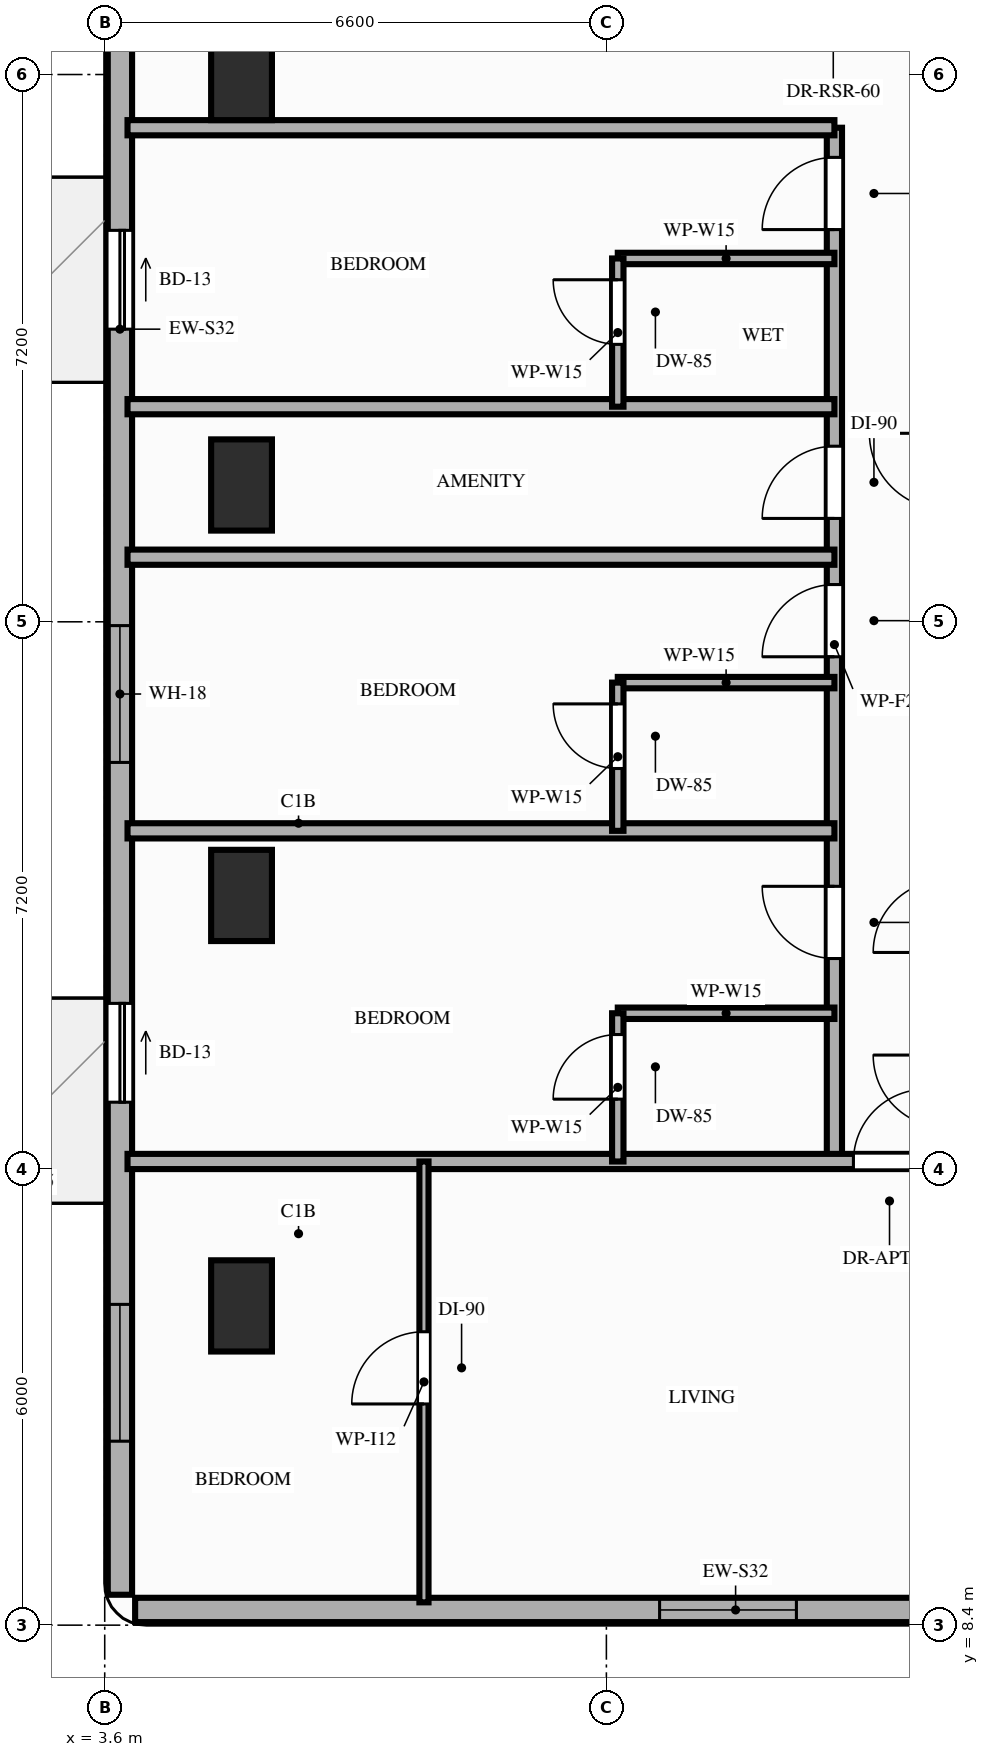
"""IFC4 building model, lengths in metres.
Left out: names, types, materials, properties, quantities, classifications, styles, units other than length and angle.
Written with IfcOpenShell. Run it as: python <this file> out.ifc"""

import sys

from ifc_helpers import new_model, si_unit, direction, frame, frame_2d, origin, origin_2d, place, context, subcontext, project, spatial, rectangle, extrude, element, fill, save


model = new_model("IFC4")
c1 = context("Model", 3, precision=1e-05, world=origin(), true_north=direction((0.0, 1.0)))
c2 = subcontext(c1, "Body", "Model", "MODEL_VIEW")
j1 = project(units=[si_unit("LENGTHUNIT", "METRE"), si_unit("PLANEANGLEUNIT", "RADIAN")], contexts=[c1])
p1 = place(None, origin())
s1 = spatial("IfcSite", under=j1, at=p1, CompositionType="ELEMENT")
p2 = place(p1, origin())
s2 = spatial("IfcBuilding", under=s1, at=p2, CompositionType="ELEMENT")
p3 = place(p2, frame((0.0, 0.0, 83.4)))
s3 = spatial("IfcBuildingStorey", under=s2, at=p3, CompositionType="ELEMENT", Elevation=83.4)
for number, where, z_axis, x_axis in (
    (1, (5.4, 12.6, 0.0), (0.0, 0.0, 1.0), (1.0, 0.0, 0.0)),
    (2, (5.4, 18.0, 0.0), (0.0, 0.0, 1.0), (1.0, 0.0, 0.0)),
    (3, (5.4, 23.4, 0.0), (0.0, 0.0, 1.0), (1.0, 0.0, 0.0)),
    (4, (5.4, 28.8, 0.0), (0.0, 0.0, 1.0), (1.0, 0.0, 0.0)),
):
    element("IfcColumn", number, at=place(p3, frame(where, z_axis=z_axis, x_axis=x_axis)), inside=s3, PredefinedType="COLUMN", context=c2, shape_type="SweptSolid", body=[
        extrude(rectangle(XDim=0.8, YDim=1.2, at=origin_2d()), origin(), (0.0, 0.0, 1.0), 3.2),
    ])
p4 = place(p3, frame((4.0, 8.6, 0.0), z_axis=(0.0, 0.0, 1.0), x_axis=(1.0, 0.0, 0.0)))
e5 = element("IfcWall", 5, at=p4, inside=s3, PredefinedType="STANDARD", context=c2, shape_type="SweptSolid", body=[
    extrude(rectangle(XDim=15.8, YDim=0.32, at=frame_2d((7.9, 0.0))), origin(), (0.0, 0.0, 1.0), 3.02),
])
p5 = place(p4, frame((6.9, 0.0, 0.85)))
e6 = element("IfcOpeningElement", 6, at=p5, cuts=e5, PredefinedType="OPENING", context=c2, shape_type="SweptSolid", body=[
    extrude(rectangle(XDim=1.8, YDim=1.75, at=frame_2d((0.9, 0.875))), frame((0.0, 0.17, 0.0), z_axis=(0.0, -1.0, 0.0), x_axis=(1.0, 0.0, 0.0)), (0.0, 0.0, 1.0), 0.34),
])
p6 = place(p3, frame((3.8, 42.1, 0.0), z_axis=(0.0, 0.0, 1.0), x_axis=(0.0, -1.0, 0.0)))
e7 = element("IfcWall", 7, at=p6, inside=s3, PredefinedType="STANDARD", context=c2, shape_type="SweptSolid", body=[
    extrude(rectangle(XDim=33.3, YDim=0.32, at=frame_2d((16.65, 0.0))), origin(), (0.0, 0.0, 1.0), 2.71),
])
p7 = place(p6, frame((25.52, 0.0, 0.0)))
e8 = element("IfcOpeningElement", 8, at=p7, cuts=e7, PredefinedType="OPENING", context=c2, shape_type="SweptSolid", body=[
    extrude(rectangle(XDim=1.3, YDim=2.08, at=frame_2d((0.65, 1.04))), frame((0.0, 0.17, 0.0), z_axis=(0.0, -1.0, 0.0), x_axis=(1.0, 0.0, 0.0)), (0.0, 0.0, 1.0), 0.34),
])
p8 = place(p6, frame((15.35, 0.0, 0.0)))
e9 = element("IfcOpeningElement", 9, at=p8, cuts=e7, PredefinedType="OPENING", context=c2, shape_type="SweptSolid", body=[
    extrude(rectangle(XDim=1.3, YDim=2.08, at=frame_2d((0.65, 1.04))), frame((0.0, 0.17, 0.0), z_axis=(0.0, -1.0, 0.0), x_axis=(1.0, 0.0, 0.0)), (0.0, 0.0, 1.0), 0.34),
])
p9 = place(p6, frame((20.55, 0.0, 0.85)))
e10 = element("IfcOpeningElement", 10, at=p9, cuts=e7, PredefinedType="OPENING", context=c2, shape_type="SweptSolid", body=[
    extrude(rectangle(XDim=1.8, YDim=1.61, at=frame_2d((0.9, 0.805))), frame((0.0, 0.17, 0.0), z_axis=(0.0, -1.0, 0.0), x_axis=(1.0, 0.0, 0.0)), (0.0, 0.0, 1.0), 0.34),
])
p10 = place(p6, frame((29.48, 0.0, 0.85)))
e11 = element("IfcOpeningElement", 11, at=p10, cuts=e7, PredefinedType="OPENING", context=c2, shape_type="SweptSolid", body=[
    extrude(rectangle(XDim=1.8, YDim=1.61, at=frame_2d((0.9, 0.805))), frame((0.0, 0.17, 0.0), z_axis=(0.0, -1.0, 0.0), x_axis=(1.0, 0.0, 0.0)), (0.0, 0.0, 1.0), 0.34),
])
p11 = place(p6, frame((9.9, 0.0, 0.85)))
e12 = element("IfcOpeningElement", 12, at=p11, cuts=e7, PredefinedType="OPENING", context=c2, shape_type="SweptSolid", body=[
    extrude(rectangle(XDim=1.8, YDim=1.61, at=frame_2d((0.9, 0.805))), frame((0.0, 0.17, 0.0), z_axis=(0.0, -1.0, 0.0), x_axis=(1.0, 0.0, 0.0)), (0.0, 0.0, 1.0), 0.34),
])
p12 = place(p6, frame((3.8, 0.0, 0.85)))
e13 = element("IfcOpeningElement", 13, at=p12, cuts=e7, PredefinedType="OPENING", context=c2, shape_type="SweptSolid", body=[
    extrude(rectangle(XDim=1.8, YDim=1.61, at=frame_2d((0.9, 0.805))), frame((0.0, 0.17, 0.0), z_axis=(0.0, -1.0, 0.0), x_axis=(1.0, 0.0, 0.0)), (0.0, 0.0, 1.0), 0.34),
])
p13 = place(p3, frame((13.2, 14.5, 0.0), z_axis=(0.0, 0.0, 1.0), x_axis=(0.0, 1.0, 0.0)))
e14 = element("IfcWall", 14, at=p13, inside=s3, PredefinedType="PARTITIONING", context=c2, shape_type="SweptSolid", body=[
    extrude(rectangle(XDim=13.6, YDim=0.2, at=frame_2d((6.8, 0.0))), origin(), (0.0, 0.0, 1.0), 2.41),
])
p14 = place(p13, frame((2.67, 0.0, 0.0)))
e15 = element("IfcOpeningElement", 15, at=p14, cuts=e14, PredefinedType="OPENING", context=c2, shape_type="SweptSolid", body=[
    extrude(rectangle(XDim=0.95, YDim=2.15, at=frame_2d((0.475, 1.075))), frame((0.0, 0.11, 0.0), z_axis=(0.0, -1.0, 0.0), x_axis=(1.0, 0.0, 0.0)), (0.0, 0.0, 1.0), 0.22),
])
p15 = place(p13, frame((8.46, 0.0, 0.0)))
e16 = element("IfcOpeningElement", 16, at=p15, cuts=e14, PredefinedType="OPENING", context=c2, shape_type="SweptSolid", body=[
    extrude(rectangle(XDim=0.95, YDim=2.15, at=frame_2d((0.475, 1.075))), frame((0.0, 0.11, 0.0), z_axis=(0.0, -1.0, 0.0), x_axis=(1.0, 0.0, 0.0)), (0.0, 0.0, 1.0), 0.22),
])
p16 = place(p13, frame((6.64, 0.0, 0.0)))
e17 = element("IfcOpeningElement", 17, at=p16, cuts=e14, PredefinedType="OPENING", context=c2, shape_type="SweptSolid", body=[
    extrude(rectangle(XDim=0.95, YDim=2.15, at=frame_2d((0.475, 1.075))), frame((0.0, 0.11, 0.0), z_axis=(0.0, -1.0, 0.0), x_axis=(1.0, 0.0, 0.0)), (0.0, 0.0, 1.0), 0.22),
])
p17 = place(p13, frame((12.26, 0.0, 0.0)))
e18 = element("IfcOpeningElement", 18, at=p17, cuts=e14, PredefinedType="OPENING", context=c2, shape_type="SweptSolid", body=[
    extrude(rectangle(XDim=0.95, YDim=2.15, at=frame_2d((0.475, 1.075))), frame((0.0, 0.11, 0.0), z_axis=(0.0, -1.0, 0.0), x_axis=(1.0, 0.0, 0.0)), (0.0, 0.0, 1.0), 0.22),
])
p18 = place(p3, frame((3.9, 14.5, 0.0), z_axis=(0.0, 0.0, 1.0), x_axis=(1.0, 0.0, 0.0)))
e19 = element("IfcWall", 19, at=p18, inside=s3, PredefinedType="PARTITIONING", context=c2, shape_type="SweptSolid", body=[
    extrude(rectangle(XDim=16.0, YDim=0.2, at=frame_2d((8.0, 0.0))), origin(), (0.0, 0.0, 1.0), 2.41),
])
p19 = place(p18, frame((9.55, 0.0, 0.0)))
e20 = element("IfcOpeningElement", 20, at=p19, cuts=e19, PredefinedType="OPENING", context=c2, shape_type="SweptSolid", body=[
    extrude(rectangle(XDim=0.95, YDim=2.15, at=frame_2d((0.475, 1.075))), frame((0.0, 0.11, 0.0), z_axis=(0.0, -1.0, 0.0), x_axis=(1.0, 0.0, 0.0)), (0.0, 0.0, 1.0), 0.22),
])
p20 = place(p3, frame((3.9, 28.1, 0.0), z_axis=(0.0, 0.0, 1.0), x_axis=(1.0, 0.0, 0.0)))
e21 = element("IfcWall", 21, at=p20, inside=s3, PredefinedType="PARTITIONING", context=c2, shape_type="SweptSolid", body=[
    extrude(rectangle(XDim=9.3, YDim=0.2, at=frame_2d((4.65, 0.0))), origin(), (0.0, 0.0, 1.0), 2.41),
])
p21 = place(p3, frame((10.35, 16.45, 0.0), z_axis=(0.0, 0.0, 1.0), x_axis=(1.0, 0.0, 0.0)))
e22 = element("IfcWall", 22, at=p21, inside=s3, PredefinedType="PARTITIONING", context=c2, shape_type="SweptSolid", body=[
    extrude(rectangle(XDim=2.85, YDim=0.15, at=frame_2d((1.425, 0.0))), origin(), (0.0, 0.0, 1.0), 2.6),
])
p22 = place(p3, frame((10.35, 14.5, 0.0), z_axis=(0.0, 0.0, 1.0), x_axis=(0.0, 1.0, 0.0)))
e23 = element("IfcWall", 23, at=p22, inside=s3, PredefinedType="PARTITIONING", context=c2, shape_type="SweptSolid", body=[
    extrude(rectangle(XDim=1.95, YDim=0.15, at=frame_2d((0.975, 0.0))), origin(), (0.0, 0.0, 1.0), 2.6),
])
p23 = place(p22, frame((0.82, 0.0, 0.0)))
e24 = element("IfcOpeningElement", 24, at=p23, cuts=e23, PredefinedType="OPENING", context=c2, shape_type="SweptSolid", body=[
    extrude(rectangle(XDim=0.85, YDim=2.1, at=frame_2d((0.425, 1.05))), frame((0.0, 0.085, 0.0), z_axis=(0.0, -1.0, 0.0), x_axis=(1.0, 0.0, 0.0)), (0.0, 0.0, 1.0), 0.17),
])
for number, where, z_axis, x_axis in (
    (25, (3.9, 18.85, 0.0), (0.0, 0.0, 1.0), (1.0, 0.0, 0.0)),
    (26, (3.9, 22.45, 0.0), (0.0, 0.0, 1.0), (1.0, 0.0, 0.0)),
):
    element("IfcWall", number, at=place(p3, frame(where, z_axis=z_axis, x_axis=x_axis)), inside=s3, PredefinedType="PARTITIONING", context=c2, shape_type="SweptSolid", body=[
        extrude(rectangle(XDim=9.3, YDim=0.2, at=frame_2d((4.65, 0.0))), origin(), (0.0, 0.0, 1.0), 2.41),
    ])
p24 = place(p3, frame((10.35, 20.8, 0.0), z_axis=(0.0, 0.0, 1.0), x_axis=(1.0, 0.0, 0.0)))
e27 = element("IfcWall", 27, at=p24, inside=s3, PredefinedType="PARTITIONING", context=c2, shape_type="SweptSolid", body=[
    extrude(rectangle(XDim=2.85, YDim=0.15, at=frame_2d((1.425, 0.0))), origin(), (0.0, 0.0, 1.0), 3.02),
])
p25 = place(p3, frame((10.35, 18.85, 0.0), z_axis=(0.0, 0.0, 1.0), x_axis=(0.0, 1.0, 0.0)))
e28 = element("IfcWall", 28, at=p25, inside=s3, PredefinedType="PARTITIONING", context=c2, shape_type="SweptSolid", body=[
    extrude(rectangle(XDim=1.95, YDim=0.15, at=frame_2d((0.975, 0.0))), origin(), (0.0, 0.0, 1.0), 2.71),
])
p26 = place(p25, frame((0.82, 0.0, 0.0)))
e29 = element("IfcOpeningElement", 29, at=p26, cuts=e28, PredefinedType="OPENING", context=c2, shape_type="SweptSolid", body=[
    extrude(rectangle(XDim=0.85, YDim=2.1, at=frame_2d((0.425, 1.05))), frame((0.0, 0.085, 0.0), z_axis=(0.0, -1.0, 0.0), x_axis=(1.0, 0.0, 0.0)), (0.0, 0.0, 1.0), 0.17),
])
p27 = place(p3, frame((3.9, 24.43, 0.0), z_axis=(0.0, 0.0, 1.0), x_axis=(1.0, 0.0, 0.0)))
e30 = element("IfcWall", 30, at=p27, inside=s3, PredefinedType="PARTITIONING", context=c2, shape_type="SweptSolid", body=[
    extrude(rectangle(XDim=9.3, YDim=0.2, at=frame_2d((4.65, 0.0))), origin(), (0.0, 0.0, 1.0), 2.41),
])
p28 = place(p3, frame((10.35, 26.38, 0.0), z_axis=(0.0, 0.0, 1.0), x_axis=(1.0, 0.0, 0.0)))
e31 = element("IfcWall", 31, at=p28, inside=s3, PredefinedType="PARTITIONING", context=c2, shape_type="SweptSolid", body=[
    extrude(rectangle(XDim=2.85, YDim=0.15, at=frame_2d((1.425, 0.0))), origin(), (0.0, 0.0, 1.0), 3.02),
])
p29 = place(p3, frame((10.35, 24.43, 0.0), z_axis=(0.0, 0.0, 1.0), x_axis=(0.0, 1.0, 0.0)))
e32 = element("IfcWall", 32, at=p29, inside=s3, PredefinedType="PARTITIONING", context=c2, shape_type="SweptSolid", body=[
    extrude(rectangle(XDim=1.95, YDim=0.15, at=frame_2d((0.975, 0.0))), origin(), (0.0, 0.0, 1.0), 2.6),
])
p30 = place(p29, frame((0.82, 0.0, 0.0)))
e33 = element("IfcOpeningElement", 33, at=p30, cuts=e32, PredefinedType="OPENING", context=c2, shape_type="SweptSolid", body=[
    extrude(rectangle(XDim=0.85, YDim=2.1, at=frame_2d((0.425, 1.05))), frame((0.0, 0.085, 0.0), z_axis=(0.0, -1.0, 0.0), x_axis=(1.0, 0.0, 0.0)), (0.0, 0.0, 1.0), 0.17),
])
p31 = place(p3, frame((7.8, 8.7, 0.0), z_axis=(0.0, 0.0, 1.0), x_axis=(0.0, 1.0, 0.0)))
e34 = element("IfcWall", 34, at=p31, inside=s3, PredefinedType="PARTITIONING", context=c2, shape_type="SweptSolid", body=[
    extrude(rectangle(XDim=5.8, YDim=0.12, at=frame_2d((2.9, 0.0))), origin(), (0.0, 0.0, 1.0), 2.41),
])
p32 = place(p31, frame((2.61, 0.0, 0.0)))
e35 = element("IfcOpeningElement", 35, at=p32, cuts=e34, PredefinedType="OPENING", context=c2, shape_type="SweptSolid", body=[
    extrude(rectangle(XDim=0.95, YDim=2.15, at=frame_2d((0.475, 1.075))), frame((0.0, 0.07, 0.0), z_axis=(0.0, -1.0, 0.0), x_axis=(1.0, 0.0, 0.0)), (0.0, 0.0, 1.0), 0.14),
])
p33 = place(p7, origin())
e36 = element("IfcDoor", 36, at=p33, inside=s3, OperationType="SLIDING_TO_LEFT", PredefinedType="DOOR", context=c2, shape_type="SweptSolid", body=[
    extrude(rectangle(XDim=1.3, YDim=2.08, at=frame_2d((0.65, 1.04))), frame((0.0, 0.025, 0.0), z_axis=(0.0, -1.0, 0.0), x_axis=(1.0, 0.0, 0.0)), (0.0, 0.0, 1.0), 0.05),
])
fill(e8, e36)
p34 = place(p8, origin())
e37 = element("IfcDoor", 37, at=p34, inside=s3, OperationType="SLIDING_TO_LEFT", PredefinedType="DOOR", context=c2, shape_type="SweptSolid", body=[
    extrude(rectangle(XDim=1.3, YDim=2.08, at=frame_2d((0.65, 1.04))), frame((0.0, 0.025, 0.0), z_axis=(0.0, -1.0, 0.0), x_axis=(1.0, 0.0, 0.0)), (0.0, 0.0, 1.0), 0.05),
])
fill(e9, e37)
p35 = place(p9, origin())
e38 = element("IfcWindow", 38, at=p35, inside=s3, PartitioningType="SINGLE_PANEL", PredefinedType="WINDOW", context=c2, shape_type="SweptSolid", body=[
    extrude(rectangle(XDim=1.8, YDim=1.61, at=frame_2d((0.9, 0.805))), frame((0.0, 0.03, 0.0), z_axis=(0.0, -1.0, 0.0), x_axis=(1.0, 0.0, 0.0)), (0.0, 0.0, 1.0), 0.06),
])
fill(e10, e38)
p36 = place(p10, origin())
e39 = element("IfcWindow", 39, at=p36, inside=s3, PartitioningType="SINGLE_PANEL", PredefinedType="WINDOW", context=c2, shape_type="SweptSolid", body=[
    extrude(rectangle(XDim=1.8, YDim=1.61, at=frame_2d((0.9, 0.805))), frame((0.0, 0.03, 0.0), z_axis=(0.0, -1.0, 0.0), x_axis=(1.0, 0.0, 0.0)), (0.0, 0.0, 1.0), 0.06),
])
fill(e11, e39)
p37 = place(p5, origin())
e40 = element("IfcWindow", 40, at=p37, inside=s3, PartitioningType="SINGLE_PANEL", PredefinedType="WINDOW", context=c2, shape_type="SweptSolid", body=[
    extrude(rectangle(XDim=1.8, YDim=1.75, at=frame_2d((0.9, 0.875))), frame((0.0, 0.03, 0.0), z_axis=(0.0, -1.0, 0.0), x_axis=(1.0, 0.0, 0.0)), (0.0, 0.0, 1.0), 0.06),
])
fill(e6, e40)
p38 = place(p23, origin())
e41 = element("IfcDoor", 41, at=p38, inside=s3, OperationType="SINGLE_SWING_LEFT", PredefinedType="DOOR", context=c2, shape_type="SweptSolid", body=[
    extrude(rectangle(XDim=0.85, YDim=2.1, at=frame_2d((0.425, 1.05))), frame((0.0, 0.025, 0.0), z_axis=(0.0, -1.0, 0.0), x_axis=(1.0, 0.0, 0.0)), (0.0, 0.0, 1.0), 0.05),
])
fill(e24, e41)
p39 = place(p14, origin())
e42 = element("IfcDoor", 42, at=p39, inside=s3, OperationType="SINGLE_SWING_RIGHT", PredefinedType="DOOR", context=c2, shape_type="SweptSolid", body=[
    extrude(rectangle(XDim=0.95, YDim=2.15, at=frame_2d((0.475, 1.075))), frame((0.0, 0.025, 0.0), z_axis=(0.0, -1.0, 0.0), x_axis=(1.0, 0.0, 0.0)), (0.0, 0.0, 1.0), 0.05),
])
fill(e15, e42)
p40 = place(p15, origin())
e43 = element("IfcDoor", 43, at=p40, inside=s3, OperationType="SINGLE_SWING_LEFT", PredefinedType="DOOR", context=c2, shape_type="SweptSolid", body=[
    extrude(rectangle(XDim=0.95, YDim=2.15, at=frame_2d((0.475, 1.075))), frame((0.0, 0.025, 0.0), z_axis=(0.0, -1.0, 0.0), x_axis=(1.0, 0.0, 0.0)), (0.0, 0.0, 1.0), 0.05),
])
fill(e16, e43)
p41 = place(p26, origin())
e44 = element("IfcDoor", 44, at=p41, inside=s3, OperationType="SINGLE_SWING_RIGHT", PredefinedType="DOOR", context=c2, shape_type="SweptSolid", body=[
    extrude(rectangle(XDim=0.85, YDim=2.1, at=frame_2d((0.425, 1.05))), frame((0.0, 0.025, 0.0), z_axis=(0.0, -1.0, 0.0), x_axis=(1.0, 0.0, 0.0)), (0.0, 0.0, 1.0), 0.05),
])
fill(e29, e44)
p42 = place(p16, origin())
e45 = element("IfcDoor", 45, at=p42, inside=s3, OperationType="SINGLE_SWING_LEFT", PredefinedType="DOOR", context=c2, shape_type="SweptSolid", body=[
    extrude(rectangle(XDim=0.95, YDim=2.15, at=frame_2d((0.475, 1.075))), frame((0.0, 0.025, 0.0), z_axis=(0.0, -1.0, 0.0), x_axis=(1.0, 0.0, 0.0)), (0.0, 0.0, 1.0), 0.05),
])
fill(e17, e45)
p43 = place(p30, origin())
e46 = element("IfcDoor", 46, at=p43, inside=s3, OperationType="SINGLE_SWING_RIGHT", PredefinedType="DOOR", context=c2, shape_type="SweptSolid", body=[
    extrude(rectangle(XDim=0.85, YDim=2.1, at=frame_2d((0.425, 1.05))), frame((0.0, 0.025, 0.0), z_axis=(0.0, -1.0, 0.0), x_axis=(1.0, 0.0, 0.0)), (0.0, 0.0, 1.0), 0.05),
])
fill(e33, e46)
p44 = place(p17, origin())
e47 = element("IfcDoor", 47, at=p44, inside=s3, OperationType="SINGLE_SWING_LEFT", PredefinedType="DOOR", context=c2, shape_type="SweptSolid", body=[
    extrude(rectangle(XDim=0.95, YDim=2.15, at=frame_2d((0.475, 1.075))), frame((0.0, 0.025, 0.0), z_axis=(0.0, -1.0, 0.0), x_axis=(1.0, 0.0, 0.0)), (0.0, 0.0, 1.0), 0.05),
])
fill(e18, e47)
p45 = place(p19, origin())
e48 = element("IfcDoor", 48, at=p45, inside=s3, OperationType="SINGLE_SWING_RIGHT", PredefinedType="DOOR", context=c2, shape_type="SweptSolid", body=[
    extrude(rectangle(XDim=0.95, YDim=2.15, at=frame_2d((0.475, 1.075))), frame((0.0, 0.025, 0.0), z_axis=(0.0, -1.0, 0.0), x_axis=(1.0, 0.0, 0.0)), (0.0, 0.0, 1.0), 0.05),
])
fill(e20, e48)
p46 = place(p32, origin())
e49 = element("IfcDoor", 49, at=p46, inside=s3, OperationType="SINGLE_SWING_LEFT", PredefinedType="DOOR", context=c2, shape_type="SweptSolid", body=[
    extrude(rectangle(XDim=0.95, YDim=2.15, at=frame_2d((0.475, 1.075))), frame((0.0, 0.025, 0.0), z_axis=(0.0, -1.0, 0.0), x_axis=(1.0, 0.0, 0.0)), (0.0, 0.0, 1.0), 0.05),
])
fill(e35, e49)
save(model, sys.argv[1])
